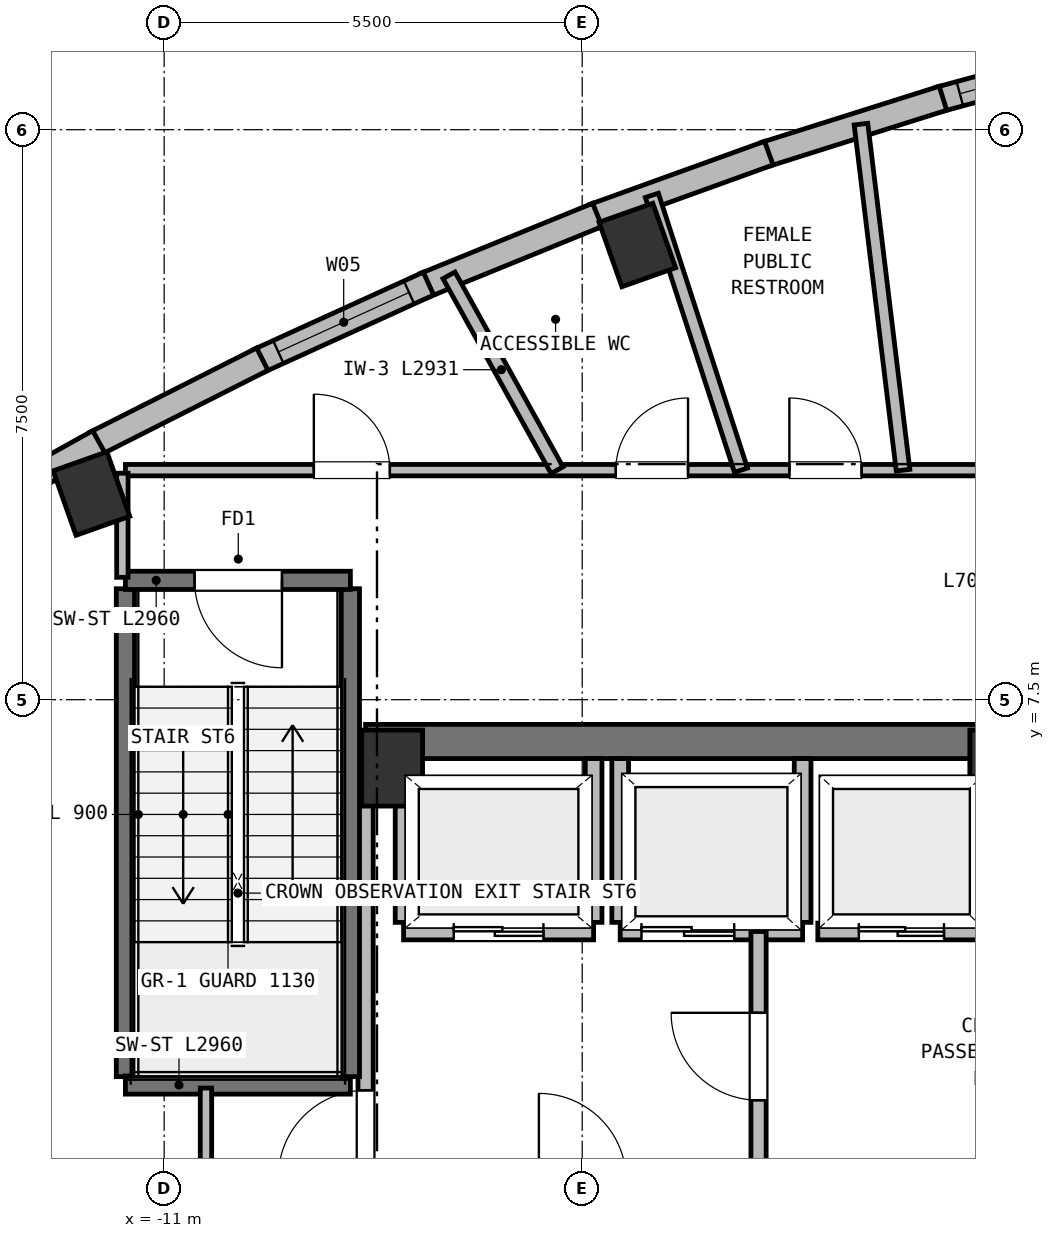
"""IFC4 building model, lengths in metres.
Left out: names, types, materials, properties, quantities, classifications, styles, units other than length and angle.
Written with IfcOpenShell. Run it as: python <this file> out.ifc"""

import sys

from ifc_helpers import new_model, si_unit, direction, frame, frame_2d, origin, origin_2d, place, context, subcontext, project, spatial, rectangle, extrude, element, fill, save


model = new_model("IFC4")
c1 = context("Model", 3, precision=1e-05, world=origin(), true_north=direction((0.0, 1.0)))
c2 = subcontext(c1, "Body", "Model", "MODEL_VIEW")
j1 = project(units=[si_unit("LENGTHUNIT", "METRE"), si_unit("PLANEANGLEUNIT", "RADIAN")], contexts=[c1])
p1 = place(None, origin())
s1 = spatial("IfcSite", under=j1, at=p1, CompositionType="ELEMENT")
p2 = place(p1, origin())
s2 = spatial("IfcBuilding", under=s1, at=p2, CompositionType="ELEMENT")
p3 = place(p2, frame((0.0, 0.0, 281.6)))
s3 = spatial("IfcBuildingStorey", under=s2, at=p3, CompositionType="ELEMENT", Elevation=281.6)
for number, where, z_axis, x_axis in (
    (1, (0.0, 6.6, 0.0), (0.0, 0.0, 1.0), (1.0, 0.0, 0.0)),
    (2, (-8.0, 6.6, 0.0), (0.0, 0.0, 1.0), (1.0, 0.0, 0.0)),
):
    element("IfcColumn", number, at=place(p3, frame(where, z_axis=z_axis, x_axis=x_axis)), inside=s3, PredefinedType="COLUMN", context=c2, shape_type="SweptSolid", body=[
        extrude(rectangle(XDim=0.8, YDim=1.0, at=origin_2d()), origin(), (0.0, 0.0, 1.0), 4.4),
    ])
p4 = place(p3, frame((-8.35, 6.95, 0.0), z_axis=(0.0, 0.0, 1.0), x_axis=(1.0, 0.0, 0.0)))
e3 = element("IfcWall", 3, at=p4, inside=s3, PredefinedType="SHEAR", context=c2, shape_type="SweptSolid", body=[
    extrude(rectangle(XDim=16.7, YDim=0.45, at=frame_2d((8.35, 0.0))), origin(), (0.0, 0.0, 1.0), 4.13),
])
for number, where, z_axis, x_axis in (
    (4, (-4.774, 13.483, 0.0), (0.0, 0.0, 1.0), (0.943, 0.334, 0.0)),
    (5, (-11.957, 10.212, 0.0), (0.0, 0.0, 1.0), (0.943, 0.334, 0.0)),
):
    element("IfcColumn", number, at=place(p3, frame(where, z_axis=z_axis, x_axis=x_axis)), inside=s3, PredefinedType="COLUMN", context=c2, shape_type="SweptSolid", body=[
        extrude(rectangle(XDim=0.75, YDim=0.9, at=origin_2d()), origin(), (0.0, 0.0, 1.0), 4.4),
    ])
p5 = place(p3, frame((-0.802, 15.399, 0.0), z_axis=(0.0, 0.0, 1.0), x_axis=(0.964933096461, 0.262495941596, 0.0)))
e6 = element("IfcWall", 6, at=p5, inside=s3, PredefinedType="SOLIDWALL", context=c2, shape_type="SweptSolid", body=[
    extrude(rectangle(XDim=2.46, YDim=0.33, at=frame_2d((1.23, 0.0))), origin(), (0.0, 0.0, 1.0), 4.13),
])
p6 = place(p5, frame((0.28, 0.0, 0.72)))
e7 = element("IfcOpeningElement", 7, at=p6, cuts=e6, PredefinedType="OPENING", context=c2, shape_type="SweptSolid", body=[
    extrude(rectangle(XDim=1.9, YDim=2.15, at=frame_2d((0.95, 1.075))), frame((0.0, 0.175, 0.0), z_axis=(0.0, -1.0, 0.0), x_axis=(1.0, 0.0, 0.0)), (0.0, 0.0, 1.0), 0.35),
])
p7 = place(p3, frame((-3.092, 14.676, 0.0), z_axis=(0.0, 0.0, 1.0), x_axis=(0.953629301066, 0.300983647643, 0.0)))
e8 = element("IfcWall", 8, at=p7, inside=s3, PredefinedType="SOLIDWALL", context=c2, shape_type="SweptSolid", body=[
    extrude(rectangle(XDim=2.452, YDim=0.33, at=frame_2d((1.226, 0.0))), origin(), (0.0, 0.0, 1.0), 4.13),
])
for number, where, z_axis, x_axis in (
    (9, (-5.347, 13.861, 0.0), (0.0, 0.0, 1.0), (0.941, 0.339, 0.0)),
    (10, (-7.568, 12.955, 0.0), (0.0, 0.0, 1.0), (0.926, 0.377, 0.0)),
):
    element("IfcWall", number, at=place(p3, frame(where, z_axis=z_axis, x_axis=x_axis)), inside=s3, PredefinedType="SOLIDWALL", context=c2, shape_type="SweptSolid", body=[
        extrude(rectangle(XDim=2.448, YDim=0.33, at=frame_2d((1.224, 0.0))), origin(), (0.0, 0.0, 1.0), 4.13),
    ])
p8 = place(p3, frame((-9.754, 11.959, 0.0), z_axis=(0.0, 0.0, 1.0), x_axis=(0.910103748432, 0.414380461763, 0.0)))
e11 = element("IfcWall", 11, at=p8, inside=s3, PredefinedType="SOLIDWALL", context=c2, shape_type="SweptSolid", body=[
    extrude(rectangle(XDim=2.452, YDim=0.33, at=frame_2d((1.226, 0.0))), origin(), (0.0, 0.0, 1.0), 4.13),
])
p9 = place(p8, frame((0.281, 0.0, 0.72)))
e12 = element("IfcOpeningElement", 12, at=p9, cuts=e11, PredefinedType="OPENING", context=c2, shape_type="SweptSolid", body=[
    extrude(rectangle(XDim=1.89, YDim=2.15, at=frame_2d((0.945, 1.075))), frame((0.0, 0.175, 0.0), z_axis=(0.0, -1.0, 0.0), x_axis=(1.0, 0.0, 0.0)), (0.0, 0.0, 1.0), 0.35),
])
p10 = place(p3, frame((-11.905, 10.872, 0.0), z_axis=(0.0, 0.0, 1.0), x_axis=(0.892653761516, 0.450743011096, 0.0)))
e13 = element("IfcWall", 13, at=p10, inside=s3, PredefinedType="SOLIDWALL", context=c2, shape_type="SweptSolid", body=[
    extrude(rectangle(XDim=2.46, YDim=0.33, at=frame_2d((1.23, 0.0))), origin(), (0.0, 0.0, 1.0), 4.13),
])
p11 = place(p3, frame((-14.021, 9.694, 0.0), z_axis=(0.0, 0.0, 1.0), x_axis=(0.873970841772, 0.485978361383, 0.0)))
e14 = element("IfcWall", 14, at=p11, inside=s3, PredefinedType="SOLIDWALL", context=c2, shape_type="SweptSolid", body=[
    extrude(rectangle(XDim=2.472, YDim=0.33, at=frame_2d((1.236, 0.0))), origin(), (0.0, 0.0, 1.0), 4.13),
])
p12 = place(p3, frame((-7.85, 4.45, 0.0), z_axis=(0.0, 0.0, 1.0), x_axis=(1.0, 0.0, 0.0)))
e15 = element("IfcWall", 15, at=p12, inside=s3, PredefinedType="PARTITIONING", context=c2, shape_type="SweptSolid", body=[
    extrude(rectangle(XDim=2.5, YDim=0.22, at=frame_2d((1.25, 0.0))), origin(), (0.0, 0.0, 1.0), 4.13),
])
p13 = place(p12, frame((0.66, 0.0, 0.0)))
e16 = element("IfcOpeningElement", 16, at=p13, cuts=e15, PredefinedType="OPENING", context=c2, shape_type="SweptSolid", body=[
    extrude(rectangle(XDim=1.18, YDim=2.15, at=frame_2d((0.59, 1.075))), frame((0.0, 0.12, 0.0), z_axis=(0.0, -1.0, 0.0), x_axis=(1.0, 0.0, 0.0)), (0.0, 0.0, 1.0), 0.24),
])
p14 = place(p3, frame((-7.85, 4.57, 0.0), z_axis=(0.0, 0.0, 1.0), x_axis=(0.0, 1.0, 0.0)))
e17 = element("IfcWall", 17, at=p14, inside=s3, PredefinedType="PARTITIONING", context=c2, shape_type="SweptSolid", body=[
    extrude(rectangle(XDim=2.155, YDim=0.22, at=frame_2d((1.078, 0.0))), origin(), (0.0, 0.0, 1.0), 3.81),
])
p15 = place(p3, frame((-5.35, 4.57, 0.0), z_axis=(0.0, 0.0, 1.0), x_axis=(0.0, 1.0, 0.0)))
e18 = element("IfcWall", 18, at=p15, inside=s3, PredefinedType="PARTITIONING", context=c2, shape_type="SweptSolid", body=[
    extrude(rectangle(XDim=2.155, YDim=0.22, at=frame_2d((1.078, 0.0))), origin(), (0.0, 0.0, 1.0), 4.13),
])
p16 = place(p3, frame((-5.0, 4.45, 0.0), z_axis=(0.0, 0.0, 1.0), x_axis=(1.0, 0.0, 0.0)))
e19 = element("IfcWall", 19, at=p16, inside=s3, PredefinedType="PARTITIONING", context=c2, shape_type="SweptSolid", body=[
    extrude(rectangle(XDim=2.4, YDim=0.22, at=frame_2d((1.2, 0.0))), origin(), (0.0, 0.0, 1.0), 4.13),
])
p17 = place(p16, frame((0.28, 0.0, 0.0)))
e20 = element("IfcOpeningElement", 20, at=p17, cuts=e19, PredefinedType="OPENING", context=c2, shape_type="SweptSolid", body=[
    extrude(rectangle(XDim=1.22, YDim=2.15, at=frame_2d((0.61, 1.075))), frame((0.0, 0.12, 0.0), z_axis=(0.0, -1.0, 0.0), x_axis=(1.0, 0.0, 0.0)), (0.0, 0.0, 1.0), 0.24),
])
for number, where, z_axis, x_axis in (
    (21, (-5.0, 4.57, 0.0), (0.0, 0.0, 1.0), (0.0, 1.0, 0.0)),
    (22, (-2.6, 4.57, 0.0), (0.0, 0.0, 1.0), (0.0, 1.0, 0.0)),
):
    element("IfcWall", number, at=place(p3, frame(where, z_axis=z_axis, x_axis=x_axis)), inside=s3, PredefinedType="PARTITIONING", context=c2, shape_type="SweptSolid", body=[
        extrude(rectangle(XDim=2.155, YDim=0.22, at=frame_2d((1.078, 0.0))), origin(), (0.0, 0.0, 1.0), 4.13),
    ])
p18 = place(p3, frame((-2.4, 4.45, 0.0), z_axis=(0.0, 0.0, 1.0), x_axis=(1.0, 0.0, 0.0)))
e23 = element("IfcWall", 23, at=p18, inside=s3, PredefinedType="PARTITIONING", context=c2, shape_type="SweptSolid", body=[
    extrude(rectangle(XDim=2.2, YDim=0.22, at=frame_2d((1.1, 0.0))), origin(), (0.0, 0.0, 1.0), 4.13),
])
p19 = place(p18, frame((0.54, 0.0, 0.0)))
e24 = element("IfcOpeningElement", 24, at=p19, cuts=e23, PredefinedType="OPENING", context=c2, shape_type="SweptSolid", body=[
    extrude(rectangle(XDim=1.12, YDim=2.15, at=frame_2d((0.56, 1.075))), frame((0.0, 0.12, 0.0), z_axis=(0.0, -1.0, 0.0), x_axis=(1.0, 0.0, 0.0)), (0.0, 0.0, 1.0), 0.24),
])
p20 = place(p3, frame((-3.18, 1.15, 0.0), z_axis=(0.0, 0.0, 1.0), x_axis=(0.0, 1.0, 0.0)))
e25 = element("IfcWall", 25, at=p20, inside=s3, PredefinedType="PARTITIONING", context=c2, shape_type="SweptSolid", body=[
    extrude(rectangle(XDim=3.3, YDim=0.2, at=frame_2d((1.65, 0.0))), origin(), (0.0, 0.0, 1.0), 4.13),
])
p21 = place(p20, frame((1.08, 0.0, 0.0)))
e26 = element("IfcOpeningElement", 26, at=p21, cuts=e25, PredefinedType="OPENING", context=c2, shape_type="SweptSolid", body=[
    extrude(rectangle(XDim=1.15, YDim=2.15, at=frame_2d((0.575, 1.075))), frame((0.0, 0.11, 0.0), z_axis=(0.0, -1.0, 0.0), x_axis=(1.0, 0.0, 0.0)), (0.0, 0.0, 1.0), 0.22),
])
p22 = place(p3, frame((-8.35, 1.15, 0.0), z_axis=(0.0, 0.0, 1.0), x_axis=(0.0, 1.0, 0.0)))
e27 = element("IfcWall", 27, at=p22, inside=s3, PredefinedType="PARTITIONING", context=c2, shape_type="SweptSolid", body=[
    extrude(rectangle(XDim=5.4, YDim=0.2, at=frame_2d((2.7, 0.0))), origin(), (0.0, 0.0, 1.0), 4.13),
])
p23 = place(p22, frame((0.06, 0.0, 0.0)))
e28 = element("IfcOpeningElement", 28, at=p23, cuts=e27, PredefinedType="OPENING", context=c2, shape_type="SweptSolid", body=[
    extrude(rectangle(XDim=1.15, YDim=2.15, at=frame_2d((0.575, 1.075))), frame((0.0, 0.11, 0.0), z_axis=(0.0, -1.0, 0.0), x_axis=(1.0, 0.0, 0.0)), (0.0, 0.0, 1.0), 0.22),
])
p24 = place(p3, frame((-11.51, 2.54, 0.0), z_axis=(0.0, 0.0, 1.0), x_axis=(0.0, 1.0, 0.0)))
e29 = element("IfcWall", 29, at=p24, inside=s3, PredefinedType="SHEAR", context=c2, shape_type="SweptSolid", body=[
    extrude(rectangle(XDim=6.42, YDim=0.24, at=frame_2d((3.21, 0.0))), origin(), (0.0, 0.0, 1.0), 4.13),
])
p25 = place(p3, frame((-11.51, 2.43, 0.0), z_axis=(0.0, 0.0, 1.0), x_axis=(1.0, 0.0, 0.0)))
e30 = element("IfcWall", 30, at=p25, inside=s3, PredefinedType="SHEAR", context=c2, shape_type="SweptSolid", body=[
    extrude(rectangle(XDim=2.96, YDim=0.24, at=frame_2d((1.48, 0.0))), origin(), (0.0, 0.0, 1.0), 4.13),
])
p26 = place(p3, frame((-8.55, 2.54, 0.0), z_axis=(0.0, 0.0, 1.0), x_axis=(0.0, 1.0, 0.0)))
e31 = element("IfcWall", 31, at=p26, inside=s3, PredefinedType="SHEAR", context=c2, shape_type="SweptSolid", body=[
    extrude(rectangle(XDim=6.42, YDim=0.24, at=frame_2d((3.21, 0.0))), origin(), (0.0, 0.0, 1.0), 4.13),
])
p27 = place(p3, frame((-8.55, 9.07, 0.0), z_axis=(0.0, 0.0, 1.0), x_axis=(-1.0, 0.0, 0.0)))
e32 = element("IfcWall", 32, at=p27, inside=s3, PredefinedType="SHEAR", context=c2, shape_type="SweptSolid", body=[
    extrude(rectangle(XDim=2.96, YDim=0.24, at=frame_2d((1.48, 0.0))), origin(), (0.0, 0.0, 1.0), 4.13),
])
p28 = place(p27, frame((0.9, 0.0, 0.0)))
e33 = element("IfcOpeningElement", 33, at=p28, cuts=e32, PredefinedType="OPENING", context=c2, shape_type="SweptSolid", body=[
    extrude(rectangle(XDim=1.15, YDim=2.15, at=frame_2d((0.575, 1.075))), frame((0.0, 0.13, 0.0), z_axis=(0.0, -1.0, 0.0), x_axis=(1.0, 0.0, 0.0)), (0.0, 0.0, 1.0), 0.26),
])
p29 = place(p3, frame((-11.51, 10.52, 0.0), z_axis=(0.0, 0.0, 1.0), x_axis=(1.0, 0.0, 0.0)))
e34 = element("IfcWall", 34, at=p29, inside=s3, PredefinedType="PARTITIONING", context=c2, shape_type="SweptSolid", body=[
    extrude(rectangle(XDim=20.09, YDim=0.15, at=frame_2d((10.045, 0.0))), origin(), (0.0, 0.0, 1.0), 4.13),
])
p30 = place(p29, frame((6.452, 0.0, 0.0)))
e35 = element("IfcOpeningElement", 35, at=p30, cuts=e34, PredefinedType="OPENING", context=c2, shape_type="SweptSolid", body=[
    extrude(rectangle(XDim=0.95, YDim=2.1, at=frame_2d((0.475, 1.05))), frame((0.0, 0.085, 0.0), z_axis=(0.0, -1.0, 0.0), x_axis=(1.0, 0.0, 0.0)), (0.0, 0.0, 1.0), 0.17),
])
p31 = place(p29, frame((8.736, 0.0, 0.0)))
e36 = element("IfcOpeningElement", 36, at=p31, cuts=e34, PredefinedType="OPENING", context=c2, shape_type="SweptSolid", body=[
    extrude(rectangle(XDim=0.95, YDim=2.1, at=frame_2d((0.475, 1.05))), frame((0.0, 0.085, 0.0), z_axis=(0.0, -1.0, 0.0), x_axis=(1.0, 0.0, 0.0)), (0.0, 0.0, 1.0), 0.17),
])
p32 = place(p29, frame((2.479, 0.0, 0.0)))
e37 = element("IfcOpeningElement", 37, at=p32, cuts=e34, PredefinedType="OPENING", context=c2, shape_type="SweptSolid", body=[
    extrude(rectangle(XDim=1.0, YDim=2.15, at=frame_2d((0.5, 1.075))), frame((0.0, 0.085, 0.0), z_axis=(0.0, -1.0, 0.0), x_axis=(1.0, 0.0, 0.0)), (0.0, 0.0, 1.0), 0.17),
])
p33 = place(p29, frame((14.61, 0.0, 0.0)))
e38 = element("IfcOpeningElement", 38, at=p33, cuts=e34, PredefinedType="OPENING", context=c2, shape_type="SweptSolid", body=[
    extrude(rectangle(XDim=1.0, YDim=2.15, at=frame_2d((0.5, 1.075))), frame((0.0, 0.085, 0.0), z_axis=(0.0, -1.0, 0.0), x_axis=(1.0, 0.0, 0.0)), (0.0, 0.0, 1.0), 0.17),
])
p34 = place(p3, frame((-11.55, 9.11, 0.0), z_axis=(0.0, 0.0, 1.0), x_axis=(0.0, 1.0, 0.0)))
e39 = element("IfcWall", 39, at=p34, inside=s3, PredefinedType="PARTITIONING", context=c2, shape_type="SweptSolid", body=[
    extrude(rectangle(XDim=1.37, YDim=0.15, at=frame_2d((0.685, 0.0))), origin(), (0.0, 0.0, 1.0), 4.13),
])
p35 = place(p3, frame((-10.45, -7.24, 0.0), z_axis=(0.0, 0.0, 1.0), x_axis=(0.0, 1.0, 0.0)))
e40 = element("IfcWall", 40, at=p35, inside=s3, PredefinedType="PARTITIONING", context=c2, shape_type="SweptSolid", body=[
    extrude(rectangle(XDim=9.63, YDim=0.15, at=frame_2d((4.815, 0.0))), origin(), (0.0, 0.0, 1.0), 4.13),
])
p36 = place(p3, frame((-5.831, 10.52, 0.0), z_axis=(0.0, 0.0, 1.0), x_axis=(-0.484857723274, 0.874593041466, 0.0)))
e41 = element("IfcWall", 41, at=p36, inside=s3, PredefinedType="PARTITIONING", context=c2, shape_type="SweptSolid", body=[
    extrude(rectangle(XDim=2.931, YDim=0.18, at=frame_2d((1.466, 0.0))), origin(), (0.0, 0.0, 1.0), 4.13),
])
p37 = place(p3, frame((-1.279, 10.52, 0.0), z_axis=(0.0, 0.0, 1.0), x_axis=(-0.120673142417, 0.992692295074, 0.0)))
e42 = element("IfcWall", 42, at=p37, inside=s3, PredefinedType="PARTITIONING", context=c2, shape_type="SweptSolid", body=[
    extrude(rectangle(XDim=4.586, YDim=0.18, at=frame_2d((2.293, 0.0))), origin(), (0.0, 0.0, 1.0), 4.13),
])
p38 = place(p3, frame((-3.411, 10.52, 0.0), z_axis=(0.0, 0.0, 1.0), x_axis=(-0.30845287095, 0.951239626174, 0.0)))
e43 = element("IfcWall", 43, at=p38, inside=s3, PredefinedType="PARTITIONING", context=c2, shape_type="SweptSolid", body=[
    extrude(rectangle(XDim=3.802, YDim=0.18, at=frame_2d((1.901, 0.0))), origin(), (0.0, 0.0, 1.0), 4.13),
])
p39 = place(p6, origin())
e44 = element("IfcWindow", 44, at=p39, inside=s3, PartitioningType="SINGLE_PANEL", PredefinedType="WINDOW", context=c2, shape_type="SweptSolid", body=[
    extrude(rectangle(XDim=1.9, YDim=2.15, at=frame_2d((0.95, 1.075))), frame((0.0, 0.03, 0.0), z_axis=(0.0, -1.0, 0.0), x_axis=(1.0, 0.0, 0.0)), (0.0, 0.0, 1.0), 0.06),
])
fill(e7, e44)
p40 = place(p9, origin())
e45 = element("IfcWindow", 45, at=p40, inside=s3, PartitioningType="SINGLE_PANEL", PredefinedType="WINDOW", context=c2, shape_type="SweptSolid", body=[
    extrude(rectangle(XDim=1.89, YDim=2.15, at=frame_2d((0.945, 1.075))), frame((0.0, 0.03, 0.0), z_axis=(0.0, -1.0, 0.0), x_axis=(1.0, 0.0, 0.0)), (0.0, 0.0, 1.0), 0.06),
])
fill(e12, e45)
p41 = place(p13, origin())
e46 = element("IfcDoor", 46, at=p41, inside=s3, OperationType="DOUBLE_DOOR_SLIDING", PredefinedType="DOOR", context=c2, shape_type="SweptSolid", body=[
    extrude(rectangle(XDim=1.18, YDim=2.15, at=frame_2d((0.59, 1.075))), frame((0.0, 0.025, 0.0), z_axis=(0.0, -1.0, 0.0), x_axis=(1.0, 0.0, 0.0)), (0.0, 0.0, 1.0), 0.05),
])
fill(e16, e46)
p42 = place(p17, origin())
e47 = element("IfcDoor", 47, at=p42, inside=s3, OperationType="DOUBLE_DOOR_SLIDING", PredefinedType="DOOR", context=c2, shape_type="SweptSolid", body=[
    extrude(rectangle(XDim=1.22, YDim=2.15, at=frame_2d((0.61, 1.075))), frame((0.0, 0.025, 0.0), z_axis=(0.0, -1.0, 0.0), x_axis=(1.0, 0.0, 0.0)), (0.0, 0.0, 1.0), 0.05),
])
fill(e20, e47)
p43 = place(p19, origin())
e48 = element("IfcDoor", 48, at=p43, inside=s3, OperationType="DOUBLE_DOOR_SLIDING", PredefinedType="DOOR", context=c2, shape_type="SweptSolid", body=[
    extrude(rectangle(XDim=1.12, YDim=2.15, at=frame_2d((0.56, 1.075))), frame((0.0, 0.025, 0.0), z_axis=(0.0, -1.0, 0.0), x_axis=(1.0, 0.0, 0.0)), (0.0, 0.0, 1.0), 0.05),
])
fill(e24, e48)
p44 = place(p21, origin())
e49 = element("IfcDoor", 49, at=p44, inside=s3, OperationType="SINGLE_SWING_RIGHT", PredefinedType="DOOR", context=c2, shape_type="SweptSolid", body=[
    extrude(rectangle(XDim=1.15, YDim=2.15, at=frame_2d((0.575, 1.075))), frame((0.0, 0.025, 0.0), z_axis=(0.0, -1.0, 0.0), x_axis=(1.0, 0.0, 0.0)), (0.0, 0.0, 1.0), 0.05),
])
fill(e26, e49)
p45 = place(p23, origin())
e50 = element("IfcDoor", 50, at=p45, inside=s3, OperationType="SINGLE_SWING_LEFT", PredefinedType="DOOR", context=c2, shape_type="SweptSolid", body=[
    extrude(rectangle(XDim=1.15, YDim=2.15, at=frame_2d((0.575, 1.075))), frame((0.0, 0.025, 0.0), z_axis=(0.0, -1.0, 0.0), x_axis=(1.0, 0.0, 0.0)), (0.0, 0.0, 1.0), 0.05),
])
fill(e28, e50)
p46 = place(p28, origin())
e51 = element("IfcDoor", 51, at=p46, inside=s3, OperationType="SINGLE_SWING_LEFT", PredefinedType="DOOR", context=c2, shape_type="SweptSolid", body=[
    extrude(rectangle(XDim=1.15, YDim=2.15, at=frame_2d((0.575, 1.075))), frame((0.0, 0.025, 0.0), z_axis=(0.0, -1.0, 0.0), x_axis=(1.0, 0.0, 0.0)), (0.0, 0.0, 1.0), 0.05),
])
fill(e33, e51)
p47 = place(p30, origin())
e52 = element("IfcDoor", 52, at=p47, inside=s3, OperationType="SINGLE_SWING_RIGHT", PredefinedType="DOOR", context=c2, shape_type="SweptSolid", body=[
    extrude(rectangle(XDim=0.95, YDim=2.1, at=frame_2d((0.475, 1.05))), frame((0.0, 0.025, 0.0), z_axis=(0.0, -1.0, 0.0), x_axis=(1.0, 0.0, 0.0)), (0.0, 0.0, 1.0), 0.05),
])
fill(e35, e52)
p48 = place(p31, origin())
e53 = element("IfcDoor", 53, at=p48, inside=s3, OperationType="SINGLE_SWING_LEFT", PredefinedType="DOOR", context=c2, shape_type="SweptSolid", body=[
    extrude(rectangle(XDim=0.95, YDim=2.1, at=frame_2d((0.475, 1.05))), frame((0.0, 0.025, 0.0), z_axis=(0.0, -1.0, 0.0), x_axis=(1.0, 0.0, 0.0)), (0.0, 0.0, 1.0), 0.05),
])
fill(e36, e53)
p49 = place(p32, origin())
e54 = element("IfcDoor", 54, at=p49, inside=s3, OperationType="SINGLE_SWING_LEFT", PredefinedType="DOOR", context=c2, shape_type="SweptSolid", body=[
    extrude(rectangle(XDim=1.0, YDim=2.15, at=frame_2d((0.5, 1.075))), frame((0.0, 0.025, 0.0), z_axis=(0.0, -1.0, 0.0), x_axis=(1.0, 0.0, 0.0)), (0.0, 0.0, 1.0), 0.05),
])
fill(e37, e54)
save(model, sys.argv[1])
